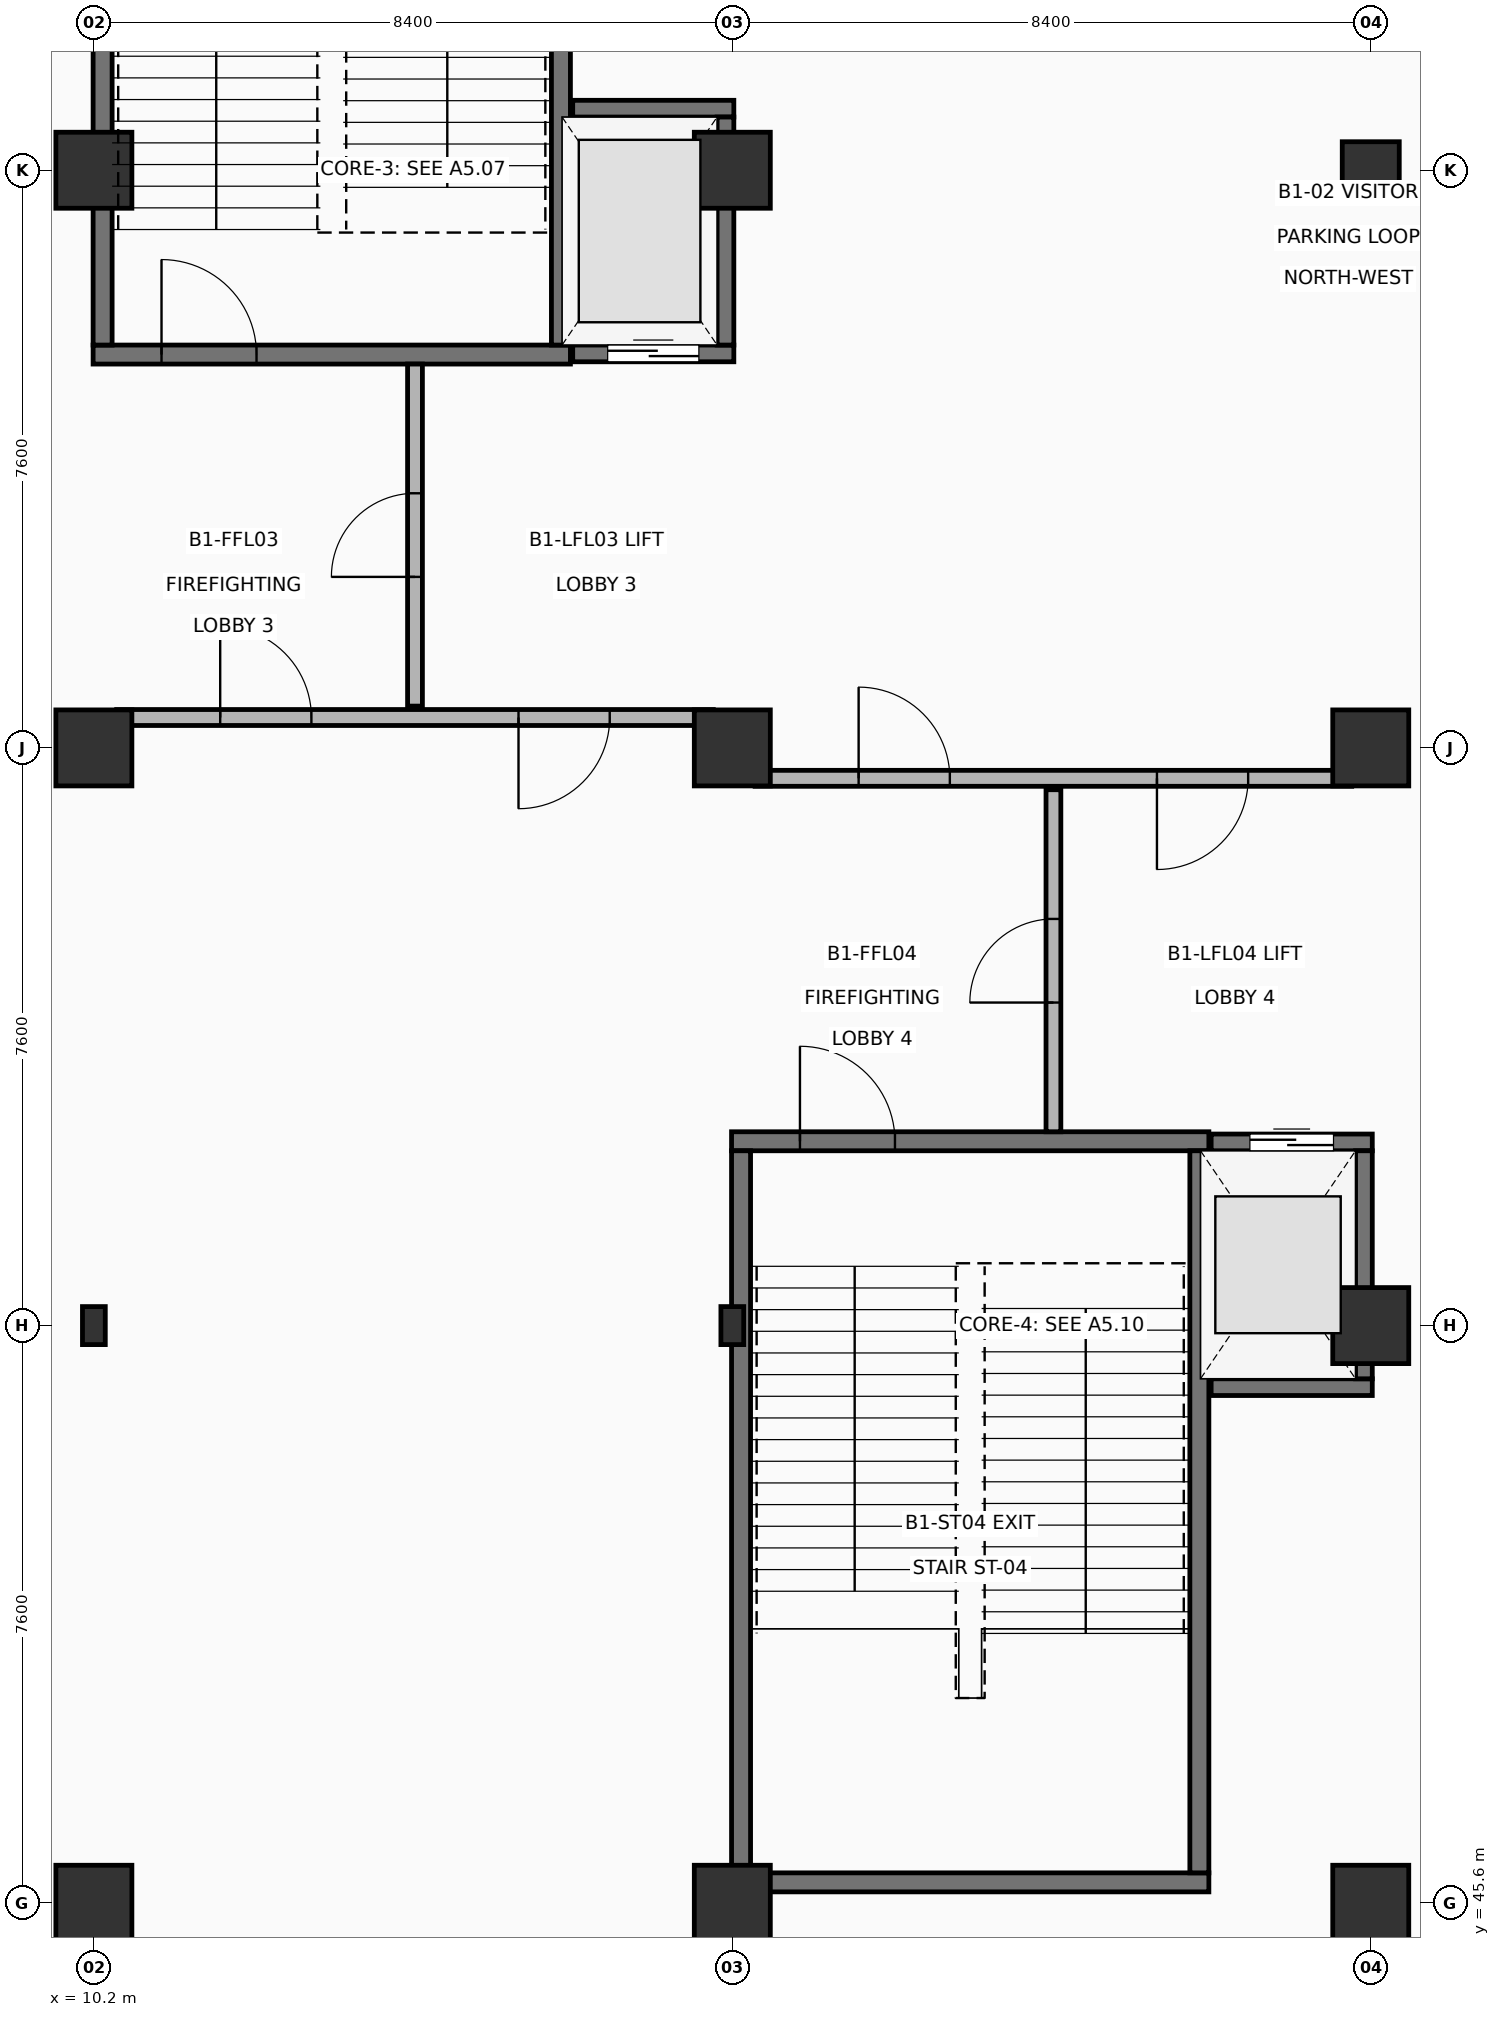
"""IFC4 building model, lengths in metres.
Left out: names, types, materials, properties, quantities, classifications, styles, units other than length and angle.
Written with IfcOpenShell. Run it as: python <this file> out.ifc"""

import sys

from ifc_helpers import new_model, si_unit, direction, frame, frame_2d, origin, origin_2d, place, context, subcontext, project, spatial, rectangle, hollow_rectangle, circle, extrude, element, fill, save


model = new_model("IFC4")
c1 = context("Model", 3, precision=1e-05, world=origin(), true_north=direction((0.0, 1.0)))
c2 = subcontext(c1, "Body", "Model", "MODEL_VIEW")
j1 = project(units=[si_unit("LENGTHUNIT", "METRE"), si_unit("PLANEANGLEUNIT", "RADIAN")], contexts=[c1])
p1 = place(None, origin())
s1 = spatial("IfcSite", under=j1, at=p1, CompositionType="ELEMENT")
p2 = place(p1, origin())
s2 = spatial("IfcBuilding", under=s1, at=p2, CompositionType="ELEMENT")
p3 = place(p2, frame((0.0, 0.0, -5.4)))
s3 = spatial("IfcBuildingStorey", under=s2, at=p3, CompositionType="ELEMENT", Elevation=-5.4)
p4 = place(p3, frame((10.2, 45.6, 0.0), z_axis=(0.0, 0.0, 1.0), x_axis=(1.0, 0.0, 0.0)))
e1 = element("IfcColumn", 1, at=p4, inside=s3, PredefinedType="COLUMN", context=c2, shape_type="SweptSolid", body=[
    extrude(rectangle(XDim=1.0, YDim=1.0, at=origin_2d()), origin(), (0.0, 0.0, 1.0), 5.4),
])
p5 = place(p3, frame((10.2, 53.2, 0.0), z_axis=(0.0, 0.0, 1.0), x_axis=(1.0, 0.0, 0.0)))
e2 = element("IfcColumn", 2, at=p5, inside=s3, PredefinedType="COLUMN", context=c2, shape_type="SweptSolid", body=[
    extrude(hollow_rectangle(XDim=0.3, YDim=0.5, WallThickness=0.016, at=origin_2d()), origin(), (0.0, 0.0, 1.0), 5.4),
])
for number, where, z_axis, x_axis in (
    (3, (10.2, 60.8, 0.0), (0.0, 0.0, 1.0), (1.0, 0.0, 0.0)),
    (4, (10.2, 68.4, 0.0), (0.0, 0.0, 1.0), (1.0, 0.0, 0.0)),
    (5, (18.6, 45.6, 0.0), (0.0, 0.0, 1.0), (1.0, 0.0, 0.0)),
):
    element("IfcColumn", number, at=place(p3, frame(where, z_axis=z_axis, x_axis=x_axis)), inside=s3, PredefinedType="COLUMN", context=c2, shape_type="SweptSolid", body=[
        extrude(rectangle(XDim=1.0, YDim=1.0, at=origin_2d()), origin(), (0.0, 0.0, 1.0), 5.4),
    ])
p6 = place(p3, frame((18.6, 53.2, 0.0), z_axis=(0.0, 0.0, 1.0), x_axis=(1.0, 0.0, 0.0)))
e6 = element("IfcColumn", 6, at=p6, inside=s3, PredefinedType="COLUMN", context=c2, shape_type="SweptSolid", body=[
    extrude(hollow_rectangle(XDim=0.3, YDim=0.5, WallThickness=0.016, at=origin_2d()), origin(), (0.0, 0.0, 1.0), 5.4),
])
for number, where, z_axis, x_axis in (
    (7, (18.6, 60.8, 0.0), (0.0, 0.0, 1.0), (1.0, 0.0, 0.0)),
    (8, (18.6, 68.4, 0.0), (0.0, 0.0, 1.0), (1.0, 0.0, 0.0)),
    (9, (27.0, 45.6, 0.0), (0.0, 0.0, 1.0), (1.0, 0.0, 0.0)),
    (10, (27.0, 53.2, 0.0), (0.0, 0.0, 1.0), (1.0, 0.0, 0.0)),
    (11, (27.0, 60.8, 0.0), (0.0, 0.0, 1.0), (1.0, 0.0, 0.0)),
):
    element("IfcColumn", number, at=place(p3, frame(where, z_axis=z_axis, x_axis=x_axis)), inside=s3, PredefinedType="COLUMN", context=c2, shape_type="SweptSolid", body=[
        extrude(rectangle(XDim=1.0, YDim=1.0, at=origin_2d()), origin(), (0.0, 0.0, 1.0), 5.4),
    ])
p7 = place(p3, frame((27.0, 68.4, 0.0), z_axis=(0.0, 0.0, 1.0), x_axis=(1.0, 0.0, 0.0)))
e12 = element("IfcColumn", 12, at=p7, inside=s3, PredefinedType="COLUMN", context=c2, shape_type="SweptSolid", body=[
    extrude(circle(Radius=0.375, at=origin_2d()), origin(), (0.0, 0.0, 1.0), 5.4),
])
p8 = place(p3, frame((10.19, 65.975, 0.0), z_axis=(0.0, 0.0, 1.0), x_axis=(1.0, 0.0, 0.0)))
e13 = element("IfcWall", 13, at=p8, inside=s3, PredefinedType="SHEAR", context=c2, shape_type="SweptSolid", body=[
    extrude(rectangle(XDim=6.28, YDim=0.25, at=frame_2d((3.14, 0.0))), origin(), (0.0, 0.0, 1.0), 5.14),
])
p9 = place(p8, frame((0.9, 0.0, 0.0)))
e14 = element("IfcOpeningElement", 14, at=p9, cuts=e13, PredefinedType="OPENING", context=c2, shape_type="SweptSolid", body=[
    extrude(rectangle(XDim=1.25, YDim=2.2, at=frame_2d((0.625, 1.1))), frame((0.0, 0.135, 0.0), z_axis=(0.0, -1.0, 0.0), x_axis=(1.0, 0.0, 0.0)), (0.0, 0.0, 1.0), 0.27),
])
for number, where, z_axis, x_axis in (
    (15, (10.315, 66.1, 0.0), (0.0, 0.0, 1.0), (0.0, 1.0, 0.0)),
    (16, (16.345, 66.1, 0.0), (0.0, 0.0, 1.0), (0.0, 1.0, 0.0)),
):
    element("IfcWall", number, at=place(p3, frame(where, z_axis=z_axis, x_axis=x_axis)), inside=s3, PredefinedType="SHEAR", context=c2, shape_type="SweptSolid", body=[
        extrude(rectangle(XDim=9.5, YDim=0.25, at=frame_2d((4.75, 0.0))), origin(), (0.0, 0.0, 1.0), 5.14),
    ])
p10 = place(p3, frame((16.5, 65.99, 0.0), z_axis=(0.0, 0.0, 1.0), x_axis=(1.0, 0.0, 0.0)))
e17 = element("IfcWall", 17, at=p10, inside=s3, PredefinedType="SHEAR", context=c2, shape_type="SweptSolid", body=[
    extrude(rectangle(XDim=2.12, YDim=0.22, at=frame_2d((1.06, 0.0))), origin(), (0.0, 0.0, 1.0), 5.14),
])
p11 = place(p10, frame((0.46, 0.0, 0.0)))
e18 = element("IfcOpeningElement", 18, at=p11, cuts=e17, PredefinedType="OPENING", context=c2, shape_type="SweptSolid", body=[
    extrude(rectangle(XDim=1.2, YDim=2.2, at=frame_2d((0.6, 1.1))), frame((0.0, 0.12, 0.0), z_axis=(0.0, -1.0, 0.0), x_axis=(1.0, 0.0, 0.0)), (0.0, 0.0, 1.0), 0.24),
])
p12 = place(p3, frame((16.5, 69.21, 0.0), z_axis=(0.0, 0.0, 1.0), x_axis=(1.0, 0.0, 0.0)))
e19 = element("IfcWall", 19, at=p12, inside=s3, PredefinedType="SHEAR", context=c2, shape_type="SweptSolid", body=[
    extrude(rectangle(XDim=2.12, YDim=0.22, at=frame_2d((1.06, 0.0))), origin(), (0.0, 0.0, 1.0), 5.14),
])
p13 = place(p3, frame((18.51, 66.1, 0.0), z_axis=(0.0, 0.0, 1.0), x_axis=(0.0, 1.0, 0.0)))
e20 = element("IfcWall", 20, at=p13, inside=s3, PredefinedType="SHEAR", context=c2, shape_type="SweptSolid", body=[
    extrude(rectangle(XDim=3.0, YDim=0.22, at=frame_2d((1.5, 0.0))), origin(), (0.0, 0.0, 1.0), 5.14),
])
p14 = place(p3, frame((10.5, 61.2, 0.0), z_axis=(0.0, 0.0, 1.0), x_axis=(1.0, 0.0, 0.0)))
e21 = element("IfcWall", 21, at=p14, inside=s3, PredefinedType="PARTITIONING", context=c2, shape_type="SweptSolid", body=[
    extrude(rectangle(XDim=7.85, YDim=0.21, at=frame_2d((3.925, 0.0))), origin(), (0.0, 0.0, 1.0), 5.14),
])
p15 = place(p14, frame((1.362, 0.0, 0.0)))
e22 = element("IfcOpeningElement", 22, at=p15, cuts=e21, PredefinedType="OPENING", context=c2, shape_type="SweptSolid", body=[
    extrude(rectangle(XDim=1.2, YDim=2.2, at=frame_2d((0.6, 1.1))), frame((0.0, 0.115, 0.0), z_axis=(0.0, -1.0, 0.0), x_axis=(1.0, 0.0, 0.0)), (0.0, 0.0, 1.0), 0.23),
])
p16 = place(p14, frame((5.287, 0.0, 0.0)))
e23 = element("IfcOpeningElement", 23, at=p16, cuts=e21, PredefinedType="OPENING", context=c2, shape_type="SweptSolid", body=[
    extrude(rectangle(XDim=1.2, YDim=2.2, at=frame_2d((0.6, 1.1))), frame((0.0, 0.115, 0.0), z_axis=(0.0, -1.0, 0.0), x_axis=(1.0, 0.0, 0.0)), (0.0, 0.0, 1.0), 0.23),
])
p17 = place(p3, frame((14.425, 61.35, 0.0), z_axis=(0.0, 0.0, 1.0), x_axis=(0.0, 1.0, 0.0)))
e24 = element("IfcWall", 24, at=p17, inside=s3, PredefinedType="PARTITIONING", context=c2, shape_type="SweptSolid", body=[
    extrude(rectangle(XDim=4.5, YDim=0.195, at=frame_2d((2.25, 0.0))), origin(), (0.0, 0.0, 1.0), 5.14),
])
p18 = place(p17, frame((1.7, 0.0, 0.0)))
e25 = element("IfcOpeningElement", 25, at=p18, cuts=e24, PredefinedType="OPENING", context=c2, shape_type="SweptSolid", body=[
    extrude(rectangle(XDim=1.1, YDim=2.15, at=frame_2d((0.55, 1.075))), frame((0.0, 0.107, 0.0), z_axis=(0.0, -1.0, 0.0), x_axis=(1.0, 0.0, 0.0)), (0.0, 0.0, 1.0), 0.215),
])
p19 = place(p3, frame((18.59, 45.875, 0.0), z_axis=(0.0, 0.0, 1.0), x_axis=(1.0, 0.0, 0.0)))
e26 = element("IfcWall", 26, at=p19, inside=s3, PredefinedType="SHEAR", context=c2, shape_type="SweptSolid", body=[
    extrude(rectangle(XDim=6.28, YDim=0.25, at=frame_2d((3.14, 0.0))), origin(), (0.0, 0.0, 1.0), 5.14),
])
p20 = place(p3, frame((18.59, 55.625, 0.0), z_axis=(0.0, 0.0, 1.0), x_axis=(1.0, 0.0, 0.0)))
e27 = element("IfcWall", 27, at=p20, inside=s3, PredefinedType="SHEAR", context=c2, shape_type="SweptSolid", body=[
    extrude(rectangle(XDim=6.28, YDim=0.25, at=frame_2d((3.14, 0.0))), origin(), (0.0, 0.0, 1.0), 5.14),
])
p21 = place(p20, frame((0.9, 0.0, 0.0)))
e28 = element("IfcOpeningElement", 28, at=p21, cuts=e27, PredefinedType="OPENING", context=c2, shape_type="SweptSolid", body=[
    extrude(rectangle(XDim=1.25, YDim=2.2, at=frame_2d((0.625, 1.1))), frame((0.0, 0.135, 0.0), z_axis=(0.0, -1.0, 0.0), x_axis=(1.0, 0.0, 0.0)), (0.0, 0.0, 1.0), 0.27),
])
for number, where, z_axis, x_axis in (
    (29, (18.715, 46.0, 0.0), (0.0, 0.0, 1.0), (0.0, 1.0, 0.0)),
    (30, (24.745, 46.0, 0.0), (0.0, 0.0, 1.0), (0.0, 1.0, 0.0)),
):
    element("IfcWall", number, at=place(p3, frame(where, z_axis=z_axis, x_axis=x_axis)), inside=s3, PredefinedType="SHEAR", context=c2, shape_type="SweptSolid", body=[
        extrude(rectangle(XDim=9.5, YDim=0.25, at=frame_2d((4.75, 0.0))), origin(), (0.0, 0.0, 1.0), 5.14),
    ])
p22 = place(p3, frame((24.9, 52.39, 0.0), z_axis=(0.0, 0.0, 1.0), x_axis=(1.0, 0.0, 0.0)))
e31 = element("IfcWall", 31, at=p22, inside=s3, PredefinedType="SHEAR", context=c2, shape_type="SweptSolid", body=[
    extrude(rectangle(XDim=2.12, YDim=0.22, at=frame_2d((1.06, 0.0))), origin(), (0.0, 0.0, 1.0), 5.14),
])
p23 = place(p3, frame((24.9, 55.61, 0.0), z_axis=(0.0, 0.0, 1.0), x_axis=(1.0, 0.0, 0.0)))
e32 = element("IfcWall", 32, at=p23, inside=s3, PredefinedType="SHEAR", context=c2, shape_type="SweptSolid", body=[
    extrude(rectangle(XDim=2.12, YDim=0.22, at=frame_2d((1.06, 0.0))), origin(), (0.0, 0.0, 1.0), 5.14),
])
p24 = place(p23, frame((0.51, 0.0, 0.0)))
e33 = element("IfcOpeningElement", 33, at=p24, cuts=e32, PredefinedType="OPENING", context=c2, shape_type="SweptSolid", body=[
    extrude(rectangle(XDim=1.1, YDim=2.15, at=frame_2d((0.55, 1.075))), frame((0.0, 0.12, 0.0), z_axis=(0.0, -1.0, 0.0), x_axis=(1.0, 0.0, 0.0)), (0.0, 0.0, 1.0), 0.24),
])
p25 = place(p3, frame((26.91, 52.5, 0.0), z_axis=(0.0, 0.0, 1.0), x_axis=(0.0, 1.0, 0.0)))
e34 = element("IfcWall", 34, at=p25, inside=s3, PredefinedType="SHEAR", context=c2, shape_type="SweptSolid", body=[
    extrude(rectangle(XDim=3.0, YDim=0.22, at=frame_2d((1.5, 0.0))), origin(), (0.0, 0.0, 1.0), 5.14),
])
p26 = place(p3, frame((18.9, 60.4, 0.0), z_axis=(0.0, 0.0, 1.0), x_axis=(1.0, 0.0, 0.0)))
e35 = element("IfcWall", 35, at=p26, inside=s3, PredefinedType="PARTITIONING", context=c2, shape_type="SweptSolid", body=[
    extrude(rectangle(XDim=7.85, YDim=0.21, at=frame_2d((3.925, 0.0))), origin(), (0.0, 0.0, 1.0), 5.14),
])
p27 = place(p26, frame((1.362, 0.0, 0.0)))
e36 = element("IfcOpeningElement", 36, at=p27, cuts=e35, PredefinedType="OPENING", context=c2, shape_type="SweptSolid", body=[
    extrude(rectangle(XDim=1.2, YDim=2.2, at=frame_2d((0.6, 1.1))), frame((0.0, 0.115, 0.0), z_axis=(0.0, -1.0, 0.0), x_axis=(1.0, 0.0, 0.0)), (0.0, 0.0, 1.0), 0.23),
])
p28 = place(p26, frame((5.287, 0.0, 0.0)))
e37 = element("IfcOpeningElement", 37, at=p28, cuts=e35, PredefinedType="OPENING", context=c2, shape_type="SweptSolid", body=[
    extrude(rectangle(XDim=1.2, YDim=2.2, at=frame_2d((0.6, 1.1))), frame((0.0, 0.115, 0.0), z_axis=(0.0, -1.0, 0.0), x_axis=(1.0, 0.0, 0.0)), (0.0, 0.0, 1.0), 0.23),
])
p29 = place(p3, frame((22.825, 55.75, 0.0), z_axis=(0.0, 0.0, 1.0), x_axis=(0.0, 1.0, 0.0)))
e38 = element("IfcWall", 38, at=p29, inside=s3, PredefinedType="PARTITIONING", context=c2, shape_type="SweptSolid", body=[
    extrude(rectangle(XDim=4.5, YDim=0.195, at=frame_2d((2.25, 0.0))), origin(), (0.0, 0.0, 1.0), 5.14),
])
p30 = place(p29, frame((1.7, 0.0, 0.0)))
e39 = element("IfcOpeningElement", 39, at=p30, cuts=e38, PredefinedType="OPENING", context=c2, shape_type="SweptSolid", body=[
    extrude(rectangle(XDim=1.1, YDim=2.15, at=frame_2d((0.55, 1.075))), frame((0.0, 0.107, 0.0), z_axis=(0.0, -1.0, 0.0), x_axis=(1.0, 0.0, 0.0)), (0.0, 0.0, 1.0), 0.215),
])
p31 = place(p9, origin())
e40 = element("IfcDoor", 40, at=p31, inside=s3, OperationType="SINGLE_SWING_LEFT", PredefinedType="DOOR", context=c2, shape_type="SweptSolid", body=[
    extrude(rectangle(XDim=1.25, YDim=2.2, at=frame_2d((0.625, 1.1))), frame((0.0, 0.025, 0.0), z_axis=(0.0, -1.0, 0.0), x_axis=(1.0, 0.0, 0.0)), (0.0, 0.0, 1.0), 0.05),
])
fill(e14, e40)
p32 = place(p11, origin())
e41 = element("IfcDoor", 41, at=p32, inside=s3, OperationType="DOUBLE_DOOR_SLIDING", PredefinedType="DOOR", context=c2, shape_type="SweptSolid", body=[
    extrude(rectangle(XDim=1.2, YDim=2.2, at=frame_2d((0.6, 1.1))), frame((0.0, 0.025, 0.0), z_axis=(0.0, -1.0, 0.0), x_axis=(1.0, 0.0, 0.0)), (0.0, 0.0, 1.0), 0.05),
])
fill(e18, e41)
p33 = place(p15, origin())
e42 = element("IfcDoor", 42, at=p33, inside=s3, OperationType="SINGLE_SWING_LEFT", PredefinedType="DOOR", context=c2, shape_type="SweptSolid", body=[
    extrude(rectangle(XDim=1.2, YDim=2.2, at=frame_2d((0.6, 1.1))), frame((0.0, 0.025, 0.0), z_axis=(0.0, -1.0, 0.0), x_axis=(1.0, 0.0, 0.0)), (0.0, 0.0, 1.0), 0.05),
])
fill(e22, e42)
p34 = place(p16, origin())
e43 = element("IfcDoor", 43, at=p34, inside=s3, OperationType="SINGLE_SWING_RIGHT", PredefinedType="DOOR", context=c2, shape_type="SweptSolid", body=[
    extrude(rectangle(XDim=1.2, YDim=2.2, at=frame_2d((0.6, 1.1))), frame((0.0, 0.025, 0.0), z_axis=(0.0, -1.0, 0.0), x_axis=(1.0, 0.0, 0.0)), (0.0, 0.0, 1.0), 0.05),
])
fill(e23, e43)
p35 = place(p18, origin())
e44 = element("IfcDoor", 44, at=p35, inside=s3, OperationType="SINGLE_SWING_LEFT", PredefinedType="DOOR", context=c2, shape_type="SweptSolid", body=[
    extrude(rectangle(XDim=1.1, YDim=2.15, at=frame_2d((0.55, 1.075))), frame((0.0, 0.025, 0.0), z_axis=(0.0, -1.0, 0.0), x_axis=(1.0, 0.0, 0.0)), (0.0, 0.0, 1.0), 0.05),
])
fill(e25, e44)
p36 = place(p21, origin())
e45 = element("IfcDoor", 45, at=p36, inside=s3, OperationType="SINGLE_SWING_LEFT", PredefinedType="DOOR", context=c2, shape_type="SweptSolid", body=[
    extrude(rectangle(XDim=1.25, YDim=2.2, at=frame_2d((0.625, 1.1))), frame((0.0, 0.025, 0.0), z_axis=(0.0, -1.0, 0.0), x_axis=(1.0, 0.0, 0.0)), (0.0, 0.0, 1.0), 0.05),
])
fill(e28, e45)
p37 = place(p24, origin())
e46 = element("IfcDoor", 46, at=p37, inside=s3, OperationType="DOUBLE_DOOR_SLIDING", PredefinedType="DOOR", context=c2, shape_type="SweptSolid", body=[
    extrude(rectangle(XDim=1.1, YDim=2.15, at=frame_2d((0.55, 1.075))), frame((0.0, 0.025, 0.0), z_axis=(0.0, -1.0, 0.0), x_axis=(1.0, 0.0, 0.0)), (0.0, 0.0, 1.0), 0.05),
])
fill(e33, e46)
p38 = place(p27, origin())
e47 = element("IfcDoor", 47, at=p38, inside=s3, OperationType="SINGLE_SWING_LEFT", PredefinedType="DOOR", context=c2, shape_type="SweptSolid", body=[
    extrude(rectangle(XDim=1.2, YDim=2.2, at=frame_2d((0.6, 1.1))), frame((0.0, 0.025, 0.0), z_axis=(0.0, -1.0, 0.0), x_axis=(1.0, 0.0, 0.0)), (0.0, 0.0, 1.0), 0.05),
])
fill(e36, e47)
p39 = place(p28, origin())
e48 = element("IfcDoor", 48, at=p39, inside=s3, OperationType="SINGLE_SWING_RIGHT", PredefinedType="DOOR", context=c2, shape_type="SweptSolid", body=[
    extrude(rectangle(XDim=1.2, YDim=2.2, at=frame_2d((0.6, 1.1))), frame((0.0, 0.025, 0.0), z_axis=(0.0, -1.0, 0.0), x_axis=(1.0, 0.0, 0.0)), (0.0, 0.0, 1.0), 0.05),
])
fill(e37, e48)
p40 = place(p30, origin())
e49 = element("IfcDoor", 49, at=p40, inside=s3, OperationType="SINGLE_SWING_LEFT", PredefinedType="DOOR", context=c2, shape_type="SweptSolid", body=[
    extrude(rectangle(XDim=1.1, YDim=2.15, at=frame_2d((0.55, 1.075))), frame((0.0, 0.025, 0.0), z_axis=(0.0, -1.0, 0.0), x_axis=(1.0, 0.0, 0.0)), (0.0, 0.0, 1.0), 0.05),
])
fill(e39, e49)
save(model, sys.argv[1])
